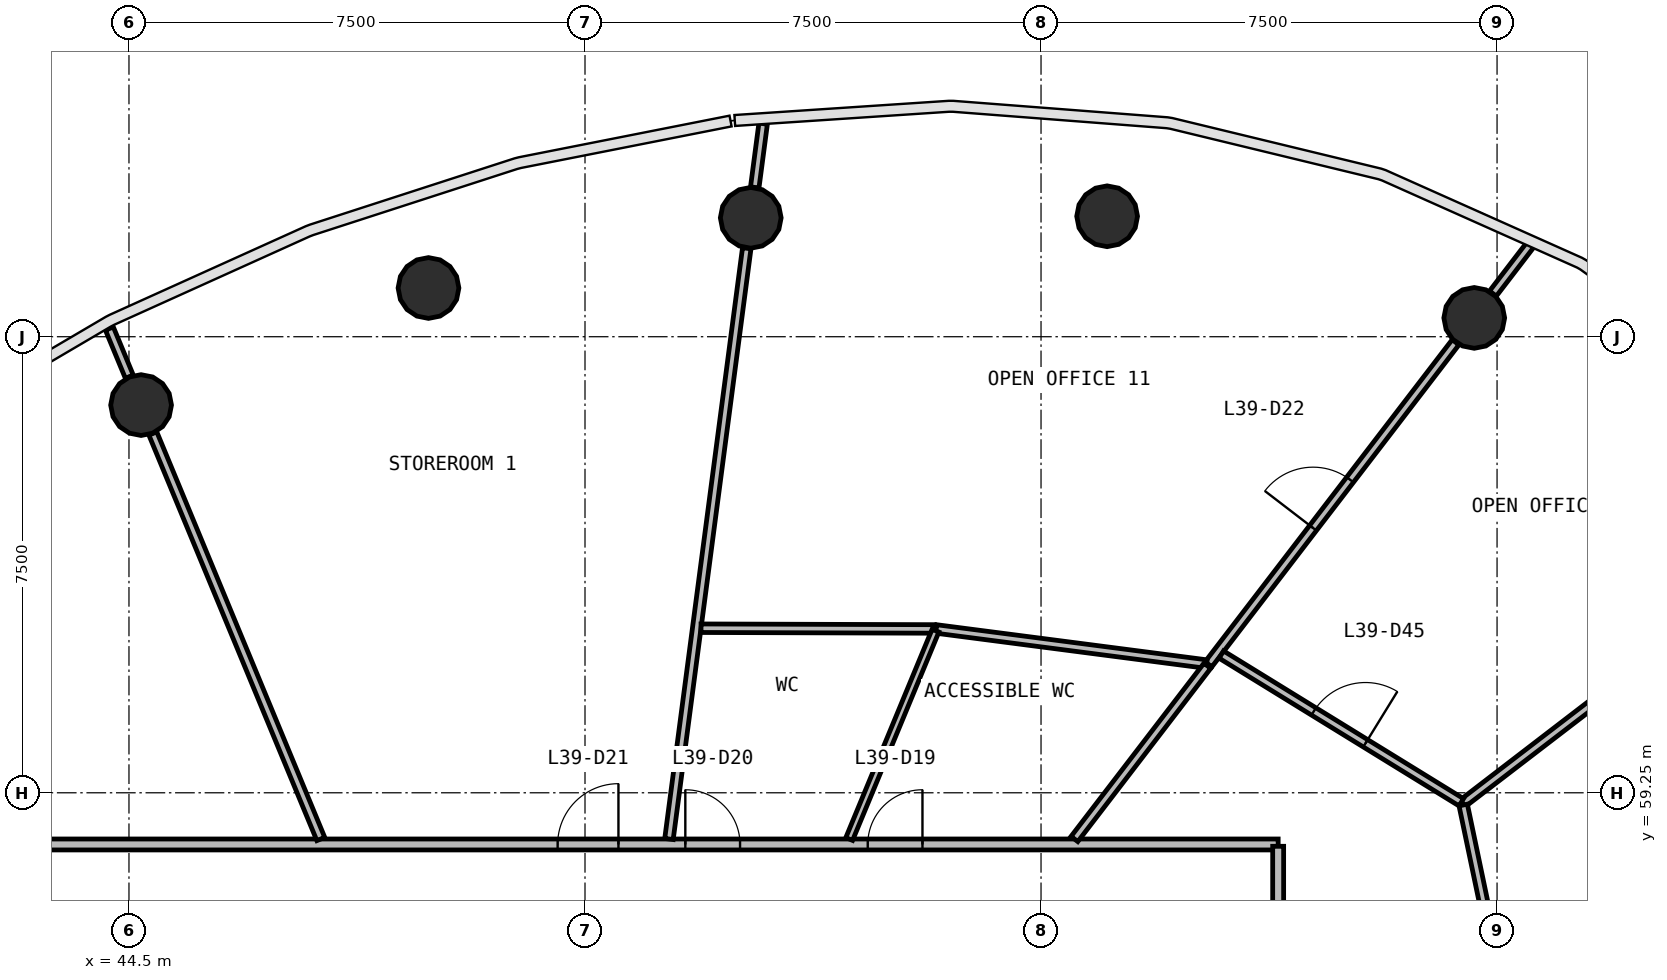
"""IFC4 building model, lengths in metres.
Left out: names, types, materials, properties, quantities, classifications, styles, units other than length and angle.
Written with IfcOpenShell. Run it as: python <this file> out.ifc"""

import sys

from ifc_helpers import new_model, si_unit, direction, frame, frame_2d, origin, origin_2d, place, context, subcontext, project, spatial, rectangle, circle, extrude, source, transform, mapped, element, fill, save


model = new_model("IFC4")
c1 = context("Model", 3, precision=1e-05, world=origin(), true_north=direction((0.0, 1.0)))
c2 = subcontext(c1, "Body", "Model", "MODEL_VIEW")
j1 = project(units=[si_unit("LENGTHUNIT", "METRE"), si_unit("PLANEANGLEUNIT", "RADIAN")], contexts=[c1])
p1 = place(None, origin())
s1 = spatial("IfcSite", under=j1, at=p1, CompositionType="ELEMENT")
p2 = place(p1, origin())
s2 = spatial("IfcBuilding", under=s1, at=p2, CompositionType="ELEMENT")
p3 = place(p2, frame((0.0, 0.0, 164.3)))
s3 = spatial("IfcBuildingStorey", under=s2, at=p3, CompositionType="ELEMENT", Elevation=164.3)
m1 = source(origin(), c2, "Body", "SweptSolid", [
    extrude(circle(Radius=0.5, at=origin_2d()), origin(), (0.0, 0.0, 1.0), 3.9),
])
for number, where, z_axis, x_axis in (
    (1, (66.625, 67.06, 0.0), (0.0, 0.0, 1.0), (1.0, 0.0, 0.0)),
    (2, (60.587, 68.731, 0.0), (0.0, 0.0, 1.0), (1.0, 0.0, 0.0)),
    (3, (54.726, 68.705, 0.0), (0.0, 0.0, 1.0), (1.0, 0.0, 0.0)),
    (4, (49.426, 67.551, 0.0), (0.0, 0.0, 1.0), (1.0, 0.0, 0.0)),
    (5, (44.699, 65.626, 0.0), (0.0, 0.0, 1.0), (1.0, 0.0, 0.0)),
):
    element("IfcColumn", number, at=place(p3, frame(where, z_axis=z_axis, x_axis=x_axis)), inside=s3, PredefinedType="COLUMN", context=c2, shape_type="MappedRepresentation", body=[
        mapped(m1, transform((0.0, 0.0, 0.0), scale=1.0)),
    ])
p4 = place(p3, frame((40.6, 58.4, 0.0), z_axis=(0.0, 0.0, 1.0), x_axis=(1.0, 0.0, 0.0)))
e6 = element("IfcWall", 6, at=p4, inside=s3, PredefinedType="PARTITIONING", context=c2, shape_type="SweptSolid", body=[
    extrude(rectangle(XDim=22.8, YDim=0.18, at=frame_2d((11.4, 0.0))), origin(), (0.0, 0.0, 1.0), 2.88),
])
p5 = place(p4, frame((16.05, 0.0, 0.0)))
e7 = element("IfcOpeningElement", 7, at=p5, cuts=e6, PredefinedType="OPENING", context=c2, shape_type="SweptSolid", body=[
    extrude(rectangle(XDim=0.9, YDim=2.1, at=frame_2d((0.45, 1.05))), frame((0.0, 0.1, 0.0), z_axis=(0.0, -1.0, 0.0), x_axis=(1.0, 0.0, 0.0)), (0.0, 0.0, 1.0), 0.2),
])
p6 = place(p4, frame((13.05, 0.0, 0.0)))
e8 = element("IfcOpeningElement", 8, at=p6, cuts=e6, PredefinedType="OPENING", context=c2, shape_type="SweptSolid", body=[
    extrude(rectangle(XDim=0.9, YDim=2.1, at=frame_2d((0.45, 1.05))), frame((0.0, 0.1, 0.0), z_axis=(0.0, -1.0, 0.0), x_axis=(1.0, 0.0, 0.0)), (0.0, 0.0, 1.0), 0.2),
])
p7 = place(p4, frame((10.95, 0.0, 0.0)))
e9 = element("IfcOpeningElement", 9, at=p7, cuts=e6, PredefinedType="OPENING", context=c2, shape_type="SweptSolid", body=[
    extrude(rectangle(XDim=1.0, YDim=2.1, at=frame_2d((0.5, 1.05))), frame((0.0, 0.1, 0.0), z_axis=(0.0, -1.0, 0.0), x_axis=(1.0, 0.0, 0.0)), (0.0, 0.0, 1.0), 0.2),
])
p8 = place(p3, frame((63.4, 58.37, 0.0), z_axis=(0.0, 0.0, 1.0), x_axis=(0.0, -1.0, 0.0)))
e10 = element("IfcWall", 10, at=p8, inside=s3, PredefinedType="PARTITIONING", context=c2, shape_type="SweptSolid", body=[
    extrude(rectangle(XDim=20.74, YDim=0.18, at=frame_2d((10.37, 0.0))), origin(), (0.0, 0.0, 1.0), 2.88),
])
p9 = place(p8, frame((15.49, 0.0, 0.0)))
e11 = element("IfcOpeningElement", 11, at=p9, cuts=e10, PredefinedType="OPENING", context=c2, shape_type="SweptSolid", body=[
    extrude(rectangle(XDim=1.0, YDim=2.1, at=frame_2d((0.5, 1.05))), frame((0.0, 0.1, 0.0), z_axis=(0.0, -1.0, 0.0), x_axis=(1.0, 0.0, 0.0)), (0.0, 0.0, 1.0), 0.2),
])
p10 = place(p8, frame((9.89, 0.0, 0.0)))
e12 = element("IfcOpeningElement", 12, at=p10, cuts=e10, PredefinedType="OPENING", context=c2, shape_type="SweptSolid", body=[
    extrude(rectangle(XDim=1.0, YDim=2.1, at=frame_2d((0.5, 1.05))), frame((0.0, 0.1, 0.0), z_axis=(0.0, -1.0, 0.0), x_axis=(1.0, 0.0, 0.0)), (0.0, 0.0, 1.0), 0.2),
])
p11 = place(p8, frame((7.69, 0.0, 0.0)))
e13 = element("IfcOpeningElement", 13, at=p11, cuts=e10, PredefinedType="OPENING", context=c2, shape_type="SweptSolid", body=[
    extrude(rectangle(XDim=1.0, YDim=2.1, at=frame_2d((0.5, 1.05))), frame((0.0, 0.1, 0.0), z_axis=(0.0, -1.0, 0.0), x_axis=(1.0, 0.0, 0.0)), (0.0, 0.0, 1.0), 0.2),
])
p12 = place(p3, frame((54.66, 68.205, 0.0), z_axis=(0.0, 0.0, 1.0), x_axis=(-0.130529918789, -0.991444370755, 0.0)))
e14 = element("IfcWall", 14, at=p12, inside=s3, PredefinedType="PARTITIONING", context=c2, shape_type="SweptSolid", body=[
    extrude(rectangle(XDim=9.799, YDim=0.14, at=frame_2d((4.899, 0.0))), origin(), (0.0, 0.0, 1.0), 2.88),
])
p13 = place(p3, frame((47.655, 58.49, 0.0), z_axis=(0.0, 0.0, 1.0), x_axis=(-0.382681357251, 0.923880392049, 0.0)))
e15 = element("IfcWall", 15, at=p13, inside=s3, PredefinedType="PARTITIONING", context=c2, shape_type="SweptSolid", body=[
    extrude(rectangle(XDim=7.219, YDim=0.14, at=frame_2d((3.609, 0.0))), origin(), (0.0, 0.0, 1.0), 2.88),
])
p14 = place(p3, frame((62.253, 61.362, 0.0), z_axis=(0.0, 0.0, 1.0), x_axis=(0.608763124529, 0.79335203927, 0.0)))
e16 = element("IfcWall", 16, at=p14, inside=s3, PredefinedType="PARTITIONING", context=c2, shape_type="SweptSolid", body=[
    extrude(rectangle(XDim=6.677, YDim=0.14, at=frame_2d((3.338, 0.0))), origin(), (0.0, 0.0, 1.0), 2.88),
])
p15 = place(p14, frame((2.827, 0.0, 0.0)))
e17 = element("IfcOpeningElement", 17, at=p15, cuts=e16, PredefinedType="OPENING", context=c2, shape_type="SweptSolid", body=[
    extrude(rectangle(XDim=1.0, YDim=2.1, at=frame_2d((0.5, 1.05))), frame((0.0, 0.08, 0.0), z_axis=(0.0, -1.0, 0.0), x_axis=(1.0, 0.0, 0.0)), (0.0, 0.0, 1.0), 0.16),
])
p16 = place(p3, frame((66.437, 59.078, 0.0), z_axis=(0.0, 0.0, 1.0), x_axis=(0.793368198418, 0.608742065032, 0.0)))
e18 = element("IfcWall", 18, at=p16, inside=s3, PredefinedType="PARTITIONING", context=c2, shape_type="SweptSolid", body=[
    extrude(rectangle(XDim=6.288, YDim=0.14, at=frame_2d((3.144, 0.0))), origin(), (0.0, 0.0, 1.0), 2.88),
])
p17 = place(p3, frame((66.443, 59.049, 0.0), z_axis=(0.0, 0.0, 1.0), x_axis=(0.205034745767, -0.978754695022, 0.0)))
e19 = element("IfcWall", 19, at=p17, inside=s3, PredefinedType="PARTITIONING", context=c2, shape_type="SweptSolid", body=[
    extrude(rectangle(XDim=4.691, YDim=0.14, at=frame_2d((2.346, 0.0))), origin(), (0.0, 0.0, 1.0), 2.88),
])
p18 = place(p17, frame((1.842, 0.0, 0.0)))
e20 = element("IfcOpeningElement", 20, at=p18, cuts=e19, PredefinedType="OPENING", context=c2, shape_type="SweptSolid", body=[
    extrude(rectangle(XDim=1.0, YDim=2.1, at=frame_2d((0.5, 1.05))), frame((0.0, 0.08, 0.0), z_axis=(0.0, -1.0, 0.0), x_axis=(1.0, 0.0, 0.0)), (0.0, 0.0, 1.0), 0.16),
])
p19 = place(p3, frame((62.465, 61.523, 0.0), z_axis=(0.0, 0.0, 1.0), x_axis=(0.851618521929, -0.524162086675, 0.0)))
e21 = element("IfcWall", 21, at=p19, inside=s3, PredefinedType="PARTITIONING", context=c2, shape_type="SweptSolid", body=[
    extrude(rectangle(XDim=4.635, YDim=0.14, at=frame_2d((2.317, 0.0))), origin(), (0.0, 0.0, 1.0), 2.88),
])
p20 = place(p19, frame((1.785, 0.0, 0.0)))
e22 = element("IfcOpeningElement", 22, at=p20, cuts=e21, PredefinedType="OPENING", context=c2, shape_type="SweptSolid", body=[
    extrude(rectangle(XDim=1.0, YDim=2.1, at=frame_2d((0.5, 1.05))), frame((0.0, 0.08, 0.0), z_axis=(0.0, -1.0, 0.0), x_axis=(1.0, 0.0, 0.0)), (0.0, 0.0, 1.0), 0.16),
])
p21 = place(p3, frame((62.224, 61.366, 0.0), z_axis=(0.0, 0.0, 1.0), x_axis=(-0.991664939434, 0.128843501572, 0.0)))
e23 = element("IfcWall", 23, at=p21, inside=s3, PredefinedType="PARTITIONING", context=c2, shape_type="SweptSolid", body=[
    extrude(rectangle(XDim=4.485, YDim=0.14, at=frame_2d((2.243, 0.0))), origin(), (0.0, 0.0, 1.0), 2.88),
])
p22 = place(p3, frame((60.049, 58.49, 0.0), z_axis=(0.0, 0.0, 1.0), x_axis=(0.608786938026, 0.793333765882, 0.0)))
e24 = element("IfcWall", 24, at=p22, inside=s3, PredefinedType="PARTITIONING", context=c2, shape_type="SweptSolid", body=[
    extrude(rectangle(XDim=3.59, YDim=0.14, at=frame_2d((1.795, 0.0))), origin(), (0.0, 0.0, 1.0), 2.88),
])
p23 = place(p3, frame((57.746, 61.944, 0.0), z_axis=(0.0, 0.0, 1.0), x_axis=(-0.99999514204, 0.003117033204, 0.0)))
e25 = element("IfcWall", 25, at=p23, inside=s3, PredefinedType="PARTITIONING", context=c2, shape_type="SweptSolid", body=[
    extrude(rectangle(XDim=3.838, YDim=0.14, at=frame_2d((1.919, 0.0))), origin(), (0.0, 0.0, 1.0), 2.88),
])
p24 = place(p3, frame((54.792, 69.205, 0.0), z_axis=(0.0, 0.0, 1.0), x_axis=(0.130561919254, 0.991440157166, 0.0)))
e26 = element("IfcWall", 26, at=p24, inside=s3, PredefinedType="PARTITIONING", context=c2, shape_type="SweptSolid", body=[
    extrude(rectangle(XDim=1.058, YDim=0.14, at=frame_2d((0.529, 0.0))), origin(), (0.0, 0.0, 1.0), 2.88),
])
p25 = place(p3, frame((66.932, 67.46, 0.0), z_axis=(0.0, 0.0, 1.0), x_axis=(0.608710939512, 0.793392079692, 0.0)))
e27 = element("IfcWall", 27, at=p25, inside=s3, PredefinedType="PARTITIONING", context=c2, shape_type="SweptSolid", body=[
    extrude(rectangle(XDim=1.027, YDim=0.14, at=frame_2d((0.514, 0.0))), origin(), (0.0, 0.0, 1.0), 2.88),
])
p26 = place(p3, frame((44.506, 66.092, 0.0), z_axis=(0.0, 0.0, 1.0), x_axis=(-0.38261179702, 0.923909201589, 0.0)))
e28 = element("IfcWall", 28, at=p26, inside=s3, PredefinedType="PARTITIONING", context=c2, shape_type="SweptSolid", body=[
    extrude(rectangle(XDim=0.857, YDim=0.14, at=frame_2d((0.428, 0.0))), origin(), (0.0, 0.0, 1.0), 2.88),
])
p27 = place(p3, frame((56.345, 58.49, 0.0), z_axis=(0.0, 0.0, 1.0), x_axis=(0.382656049384, 0.923890874438, 0.0)))
e29 = element("IfcWall", 29, at=p27, inside=s3, PredefinedType="PARTITIONING", context=c2, shape_type="SweptSolid", body=[
    extrude(rectangle(XDim=3.709, YDim=0.12, at=frame_2d((1.854, 0.0))), origin(), (0.0, 0.0, 1.0), 2.88),
])
m2 = source(origin(), c2, "Body", "SweptSolid", [
    extrude(rectangle(XDim=0.9, YDim=2.1, at=frame_2d((0.45, 1.05))), frame((0.0, 0.025, 0.0), z_axis=(0.0, -1.0, 0.0), x_axis=(1.0, 0.0, 0.0)), (0.0, 0.0, 1.0), 0.05),
])
p28 = place(p5, origin())
e30 = element("IfcDoor", 30, at=p28, inside=s3, OperationType="SINGLE_SWING_RIGHT", PredefinedType="DOOR", context=c2, shape_type="MappedRepresentation", body=[
    mapped(m2, transform((0.0, 0.0, 0.0), scale=1.0)),
])
fill(e7, e30)
p29 = place(p6, origin())
e31 = element("IfcDoor", 31, at=p29, inside=s3, OperationType="SINGLE_SWING_LEFT", PredefinedType="DOOR", context=c2, shape_type="MappedRepresentation", body=[
    mapped(m2, transform((0.0, 0.0, 0.0), scale=1.0)),
])
fill(e8, e31)
m3 = source(origin(), c2, "Body", "SweptSolid", [
    extrude(rectangle(XDim=1.0, YDim=2.1, at=frame_2d((0.5, 1.05))), frame((0.0, 0.025, 0.0), z_axis=(0.0, -1.0, 0.0), x_axis=(1.0, 0.0, 0.0)), (0.0, 0.0, 1.0), 0.05),
])
p30 = place(p7, origin())
e32 = element("IfcDoor", 32, at=p30, inside=s3, OperationType="SINGLE_SWING_RIGHT", PredefinedType="DOOR", context=c2, shape_type="MappedRepresentation", body=[
    mapped(m3, transform((0.0, 0.0, 0.0), scale=1.0)),
])
fill(e9, e32)
p31 = place(p15, origin())
e33 = element("IfcDoor", 33, at=p31, inside=s3, OperationType="SINGLE_SWING_LEFT", PredefinedType="DOOR", context=c2, shape_type="MappedRepresentation", body=[
    mapped(m3, transform((0.0, 0.0, 0.0), scale=1.0)),
])
fill(e17, e33)
p32 = place(p20, origin())
e34 = element("IfcDoor", 34, at=p32, inside=s3, OperationType="SINGLE_SWING_RIGHT", PredefinedType="DOOR", context=c2, shape_type="MappedRepresentation", body=[
    mapped(m3, transform((0.0, 0.0, 0.0), scale=1.0)),
])
fill(e22, e34)
save(model, sys.argv[1])
